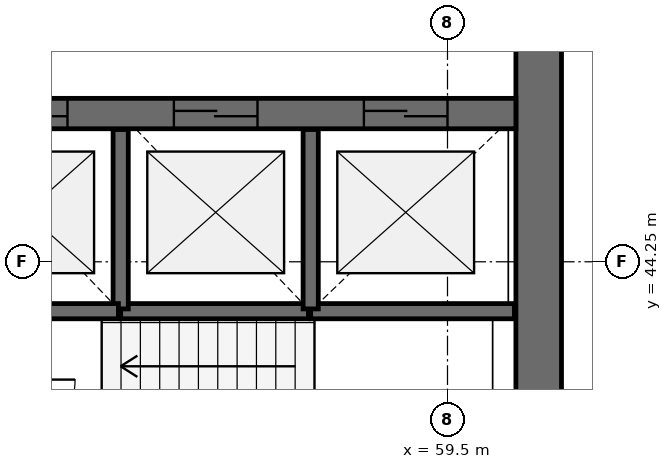
"""IFC4 building model, lengths in metres.
Left out: names, types, materials, properties, quantities, classifications, styles, units other than length and angle.
Written with IfcOpenShell. Run it as: python <this file> out.ifc"""

import sys

from ifc_helpers import new_model, si_unit, direction, frame, frame_2d, origin, place, context, subcontext, project, spatial, rectangle, extrude, source, transform, mapped, element, fill, save


model = new_model("IFC4")
c1 = context("Model", 3, precision=1e-05, world=origin(), true_north=direction((0.0, 1.0)))
c2 = subcontext(c1, "Body", "Model", "MODEL_VIEW")
j1 = project(units=[si_unit("LENGTHUNIT", "METRE"), si_unit("PLANEANGLEUNIT", "RADIAN")], contexts=[c1])
p1 = place(None, origin())
s1 = spatial("IfcSite", under=j1, at=p1, CompositionType="ELEMENT")
p2 = place(p1, origin())
s2 = spatial("IfcBuilding", under=s1, at=p2, CompositionType="ELEMENT")
p3 = place(p2, frame((0.0, 0.0, 183.8)))
s3 = spatial("IfcBuildingStorey", under=s2, at=p3, CompositionType="ELEMENT", Elevation=183.8)
p4 = place(p3, frame((60.7, 40.0, 0.0), z_axis=(0.0, 0.0, 1.0), x_axis=(0.0, 1.0, 0.0)))
e1 = element("IfcWall", 1, at=p4, inside=s3, PredefinedType="SHEAR", context=c2, shape_type="SweptSolid", body=[
    extrude(rectangle(XDim=16.0, YDim=0.6, at=frame_2d((8.0, 0.0))), origin(), (0.0, 0.0, 1.0), 3.9),
])
p5 = place(p4, frame((7.1, 0.0, 0.0)))
e2 = element("IfcOpeningElement", 2, at=p5, cuts=e1, PredefinedType="OPENING", context=c2, shape_type="SweptSolid", body=[
    extrude(rectangle(XDim=1.8, YDim=2.1, at=frame_2d((0.9, 1.05))), frame((0.0, 0.31, 0.0), z_axis=(0.0, -1.0, 0.0), x_axis=(1.0, 0.0, 0.0)), (0.0, 0.0, 1.0), 0.62),
])
p6 = place(p3, frame((43.6, 46.2, 0.0), z_axis=(0.0, 0.0, 1.0), x_axis=(1.0, 0.0, 0.0)))
e3 = element("IfcWall", 3, at=p6, inside=s3, PredefinedType="SHEAR", context=c2, shape_type="SweptSolid", body=[
    extrude(rectangle(XDim=16.8, YDim=0.4, at=frame_2d((8.4, 0.0))), origin(), (0.0, 0.0, 1.0), 3.9),
])
p7 = place(p6, frame((9.8, 0.0, 0.0)))
e4 = element("IfcOpeningElement", 4, at=p7, cuts=e3, PredefinedType="OPENING", context=c2, shape_type="SweptSolid", body=[
    extrude(rectangle(XDim=1.1, YDim=2.1, at=frame_2d((0.55, 1.05))), frame((0.0, 0.21, 0.0), z_axis=(0.0, -1.0, 0.0), x_axis=(1.0, 0.0, 0.0)), (0.0, 0.0, 1.0), 0.42),
])
p8 = place(p6, frame((12.3, 0.0, 0.0)))
e5 = element("IfcOpeningElement", 5, at=p8, cuts=e3, PredefinedType="OPENING", context=c2, shape_type="SweptSolid", body=[
    extrude(rectangle(XDim=1.1, YDim=2.1, at=frame_2d((0.55, 1.05))), frame((0.0, 0.21, 0.0), z_axis=(0.0, -1.0, 0.0), x_axis=(1.0, 0.0, 0.0)), (0.0, 0.0, 1.0), 0.42),
])
p9 = place(p6, frame((14.8, 0.0, 0.0)))
e6 = element("IfcOpeningElement", 6, at=p9, cuts=e3, PredefinedType="OPENING", context=c2, shape_type="SweptSolid", body=[
    extrude(rectangle(XDim=1.1, YDim=2.1, at=frame_2d((0.55, 1.05))), frame((0.0, 0.21, 0.0), z_axis=(0.0, -1.0, 0.0), x_axis=(1.0, 0.0, 0.0)), (0.0, 0.0, 1.0), 0.42),
])
p10 = place(p6, frame((7.85, 0.0, 0.0)))
e7 = element("IfcOpeningElement", 7, at=p10, cuts=e3, PredefinedType="OPENING", context=c2, shape_type="SweptSolid", body=[
    extrude(rectangle(XDim=0.9, YDim=2.1, at=frame_2d((0.45, 1.05))), frame((0.0, 0.21, 0.0), z_axis=(0.0, -1.0, 0.0), x_axis=(1.0, 0.0, 0.0)), (0.0, 0.0, 1.0), 0.42),
])
p11 = place(p3, frame((57.7, 43.6, 0.0), z_axis=(0.0, 0.0, 1.0), x_axis=(1.0, 0.0, 0.0)))
e8 = element("IfcWall", 8, at=p11, inside=s3, PredefinedType="SOLIDWALL", context=c2, shape_type="SweptSolid", body=[
    extrude(rectangle(XDim=2.68, YDim=0.2, at=frame_2d((1.34, 0.0))), origin(), (0.0, 0.0, 1.0), 3.58),
])
p12 = place(p3, frame((55.2, 43.6, 0.0), z_axis=(0.0, 0.0, 1.0), x_axis=(1.0, 0.0, 0.0)))
e9 = element("IfcWall", 9, at=p12, inside=s3, PredefinedType="SOLIDWALL", context=c2, shape_type="SweptSolid", body=[
    extrude(rectangle(XDim=2.47, YDim=0.2, at=frame_2d((1.235, 0.0))), origin(), (0.0, 0.0, 1.0), 3.58),
])
for number, where, z_axis, x_axis in (
    (10, (55.2, 43.63, 0.0), (0.0, 0.0, 1.0), (0.0, 1.0, 0.0)),
    (11, (57.7, 43.63, 0.0), (0.0, 0.0, 1.0), (0.0, 1.0, 0.0)),
):
    element("IfcWall", number, at=place(p3, frame(where, z_axis=z_axis, x_axis=x_axis)), inside=s3, PredefinedType="SOLIDWALL", context=c2, shape_type="SweptSolid", body=[
        extrude(rectangle(XDim=2.36, YDim=0.2, at=frame_2d((1.18, 0.0))), origin(), (0.0, 0.0, 1.0), 3.58),
    ])
p13 = place(p3, frame((53.63, 43.6, 0.0), z_axis=(0.0, 0.0, 1.0), x_axis=(1.0, 0.0, 0.0)))
e12 = element("IfcWall", 12, at=p13, inside=s3, PredefinedType="SOLIDWALL", context=c2, shape_type="SweptSolid", body=[
    extrude(rectangle(XDim=1.54, YDim=0.2, at=frame_2d((0.77, 0.0))), origin(), (0.0, 0.0, 1.0), 3.58),
])
m1 = source(origin(), c2, "Body", "SweptSolid", [
    extrude(rectangle(XDim=1.1, YDim=2.1, at=frame_2d((0.55, 1.05))), frame((0.0, 0.025, 0.0), z_axis=(0.0, -1.0, 0.0), x_axis=(1.0, 0.0, 0.0)), (0.0, 0.0, 1.0), 0.05),
])
p14 = place(p7, origin())
e13 = element("IfcDoor", 13, at=p14, inside=s3, OperationType="DOUBLE_DOOR_SLIDING", PredefinedType="USERDEFINED", context=c2, shape_type="MappedRepresentation", body=[
    mapped(m1, transform((0.0, 0.0, 0.0), scale=1.0)),
])
fill(e4, e13)
p15 = place(p8, origin())
e14 = element("IfcDoor", 14, at=p15, inside=s3, OperationType="DOUBLE_DOOR_SLIDING", PredefinedType="USERDEFINED", context=c2, shape_type="MappedRepresentation", body=[
    mapped(m1, transform((0.0, 0.0, 0.0), scale=1.0)),
])
fill(e5, e14)
p16 = place(p9, origin())
e15 = element("IfcDoor", 15, at=p16, inside=s3, OperationType="DOUBLE_DOOR_SLIDING", PredefinedType="USERDEFINED", context=c2, shape_type="MappedRepresentation", body=[
    mapped(m1, transform((0.0, 0.0, 0.0), scale=1.0)),
])
fill(e6, e15)
save(model, sys.argv[1])
